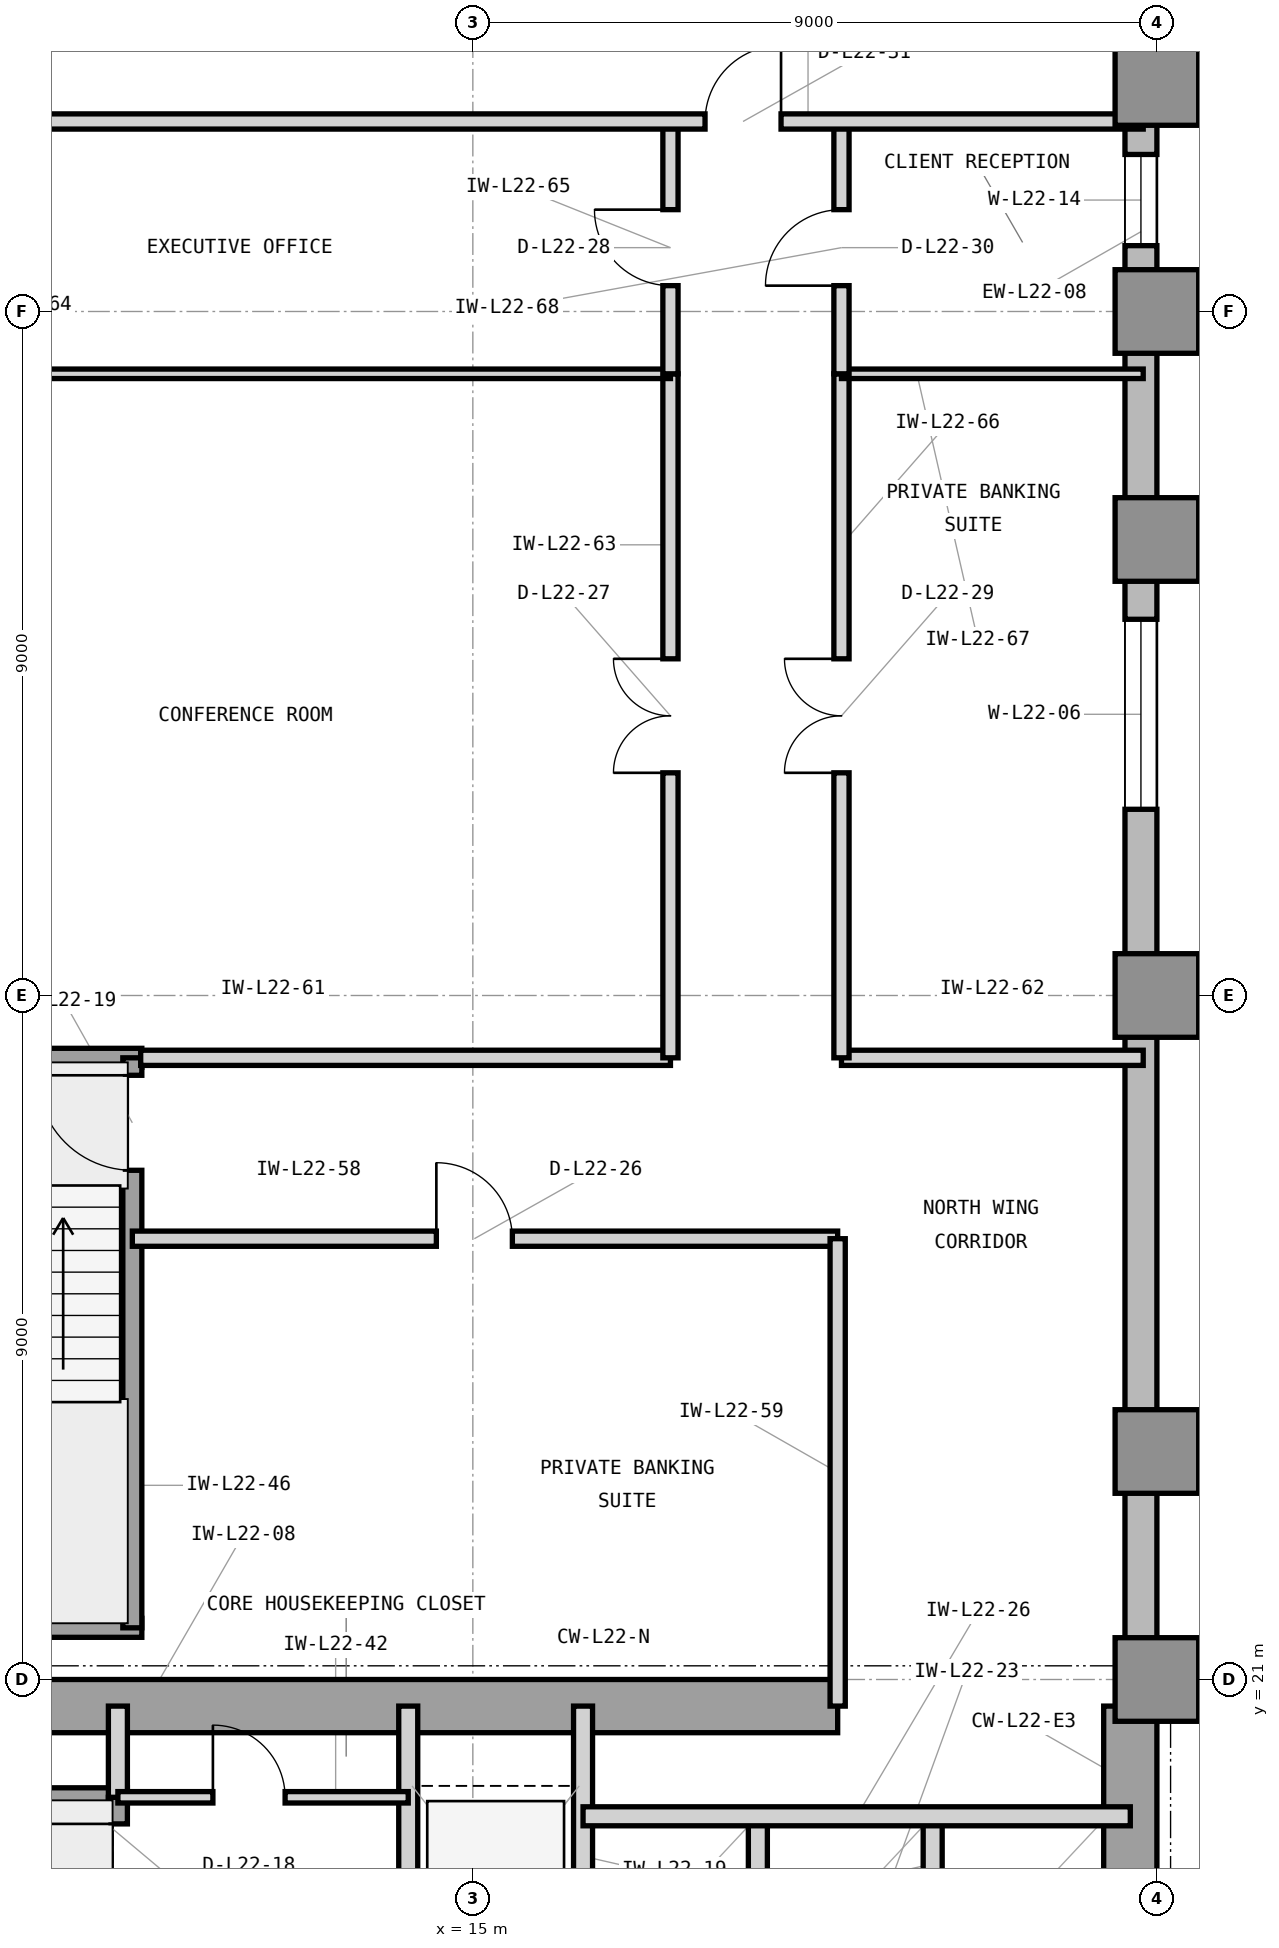
"""IFC4 building model, lengths in metres.
Left out: names, types, materials, properties, quantities, classifications, styles, units other than length and angle.
Written with IfcOpenShell. Run it as: python <this file> out.ifc"""

import sys

from ifc_helpers import new_model, si_unit, direction, frame, frame_2d, origin, origin_2d, place, context, subcontext, project, spatial, rectangle, extrude, element, fill, save


model = new_model("IFC4")
c1 = context("Model", 3, precision=1e-05, world=origin(), true_north=direction((0.0, 1.0)))
c2 = subcontext(c1, "Body", "Model", "MODEL_VIEW")
j1 = project(units=[si_unit("LENGTHUNIT", "METRE"), si_unit("PLANEANGLEUNIT", "RADIAN")], contexts=[c1])
p1 = place(None, origin())
s1 = spatial("IfcSite", under=j1, at=p1, CompositionType="ELEMENT")
p2 = place(p1, origin())
s2 = spatial("IfcBuilding", under=s1, at=p2, CompositionType="ELEMENT")
p3 = place(p2, frame((0.0, 0.0, 97.2)))
s3 = spatial("IfcBuildingStorey", under=s2, at=p3, CompositionType="ELEMENT", Elevation=97.2)
p4 = place(p3, frame((7.475, 20.65, 0.0), z_axis=(0.0, 0.0, 1.0), x_axis=(1.0, 0.0, 0.0)))
e1 = element("IfcWall", 1, at=p4, inside=s3, PredefinedType="SHEAR", context=c2, shape_type="SweptSolid", body=[
    extrude(rectangle(XDim=12.325, YDim=0.7, at=frame_2d((6.163, 0.0))), origin(), (0.0, 0.0, 1.0), 3.9),
])
p5 = place(p3, frame((23.65, 16.6, 0.0), z_axis=(0.0, 0.0, 1.0), x_axis=(0.0, 1.0, 0.0)))
e2 = element("IfcWall", 2, at=p5, inside=s3, PredefinedType="SHEAR", context=c2, shape_type="SweptSolid", body=[
    extrude(rectangle(XDim=4.05, YDim=0.7, at=frame_2d((2.025, 0.0))), origin(), (0.0, 0.0, 1.0), 3.9),
])
for number, where, z_axis, x_axis in (
    (3, (24.0, 21.0, 0.0), (0.0, 0.0, 1.0), (1.0, 0.0, 0.0)),
    (4, (24.0, 24.0, 0.0), (0.0, 0.0, 1.0), (1.0, 0.0, 0.0)),
    (5, (24.0, 30.0, 0.0), (0.0, 0.0, 1.0), (1.0, 0.0, 0.0)),
    (6, (24.0, 36.0, 0.0), (0.0, 0.0, 1.0), (1.0, 0.0, 0.0)),
    (7, (24.0, 39.0, 0.0), (0.0, 0.0, 1.0), (1.0, 0.0, 0.0)),
    (8, (24.0, 42.0, 0.0), (0.0, 0.0, 1.0), (1.0, 0.0, 0.0)),
):
    element("IfcColumn", number, at=place(p3, frame(where, z_axis=z_axis, x_axis=x_axis)), inside=s3, PredefinedType="COLUMN", context=c2, shape_type="SweptSolid", body=[
        extrude(rectangle(XDim=1.1, YDim=1.1, at=origin_2d()), origin(), (0.0, 0.0, 1.0), 3.9),
    ])
p6 = place(p3, frame((61.4, 20.79, 0.0), z_axis=(0.0, 0.0, 1.0), x_axis=(-1.0, 0.0, 0.0)))
e9 = element("IfcWall", 9, at=p6, inside=s3, PredefinedType="STANDARD", context=c2, shape_type="SweptSolid", body=[
    extrude(rectangle(XDim=37.4, YDim=0.42, at=frame_2d((18.7, 0.0))), origin(), (0.0, 0.0, 1.0), 3.7),
])
p7 = place(p6, frame((15.113, 0.0, 0.85)))
e10 = element("IfcOpeningElement", 10, at=p7, cuts=e9, PredefinedType="OPENING", context=c2, shape_type="SweptSolid", body=[
    extrude(rectangle(XDim=2.5, YDim=2.25, at=frame_2d((1.25, 1.125))), frame((0.0, 0.22, 0.0), z_axis=(0.0, -1.0, 0.0), x_axis=(1.0, 0.0, 0.0)), (0.0, 0.0, 1.0), 0.44),
])
p8 = place(p6, frame((24.462, 0.0, 0.85)))
e11 = element("IfcOpeningElement", 11, at=p8, cuts=e9, PredefinedType="OPENING", context=c2, shape_type="SweptSolid", body=[
    extrude(rectangle(XDim=2.5, YDim=2.25, at=frame_2d((1.25, 1.125))), frame((0.0, 0.22, 0.0), z_axis=(0.0, -1.0, 0.0), x_axis=(1.0, 0.0, 0.0)), (0.0, 0.0, 1.0), 0.44),
])
p9 = place(p3, frame((23.79, 21.0, 0.0), z_axis=(0.0, 0.0, 1.0), x_axis=(0.0, 1.0, 0.0)))
e12 = element("IfcWall", 12, at=p9, inside=s3, PredefinedType="STANDARD", context=c2, shape_type="SweptSolid", body=[
    extrude(rectangle(XDim=25.4, YDim=0.42, at=frame_2d((12.7, 0.0))), origin(), (0.0, 0.0, 1.0), 3.7),
])
p10 = place(p9, frame((11.45, 0.0, 0.85)))
e13 = element("IfcOpeningElement", 13, at=p10, cuts=e12, PredefinedType="OPENING", context=c2, shape_type="SweptSolid", body=[
    extrude(rectangle(XDim=2.5, YDim=2.25, at=frame_2d((1.25, 1.125))), frame((0.0, 0.22, 0.0), z_axis=(0.0, -1.0, 0.0), x_axis=(1.0, 0.0, 0.0)), (0.0, 0.0, 1.0), 0.44),
])
p11 = place(p9, frame((18.866, 0.0, 0.85)))
e14 = element("IfcOpeningElement", 14, at=p11, cuts=e12, PredefinedType="OPENING", context=c2, shape_type="SweptSolid", body=[
    extrude(rectangle(XDim=1.2, YDim=2.25, at=frame_2d((0.6, 1.125))), frame((0.0, 0.22, 0.0), z_axis=(0.0, -1.0, 0.0), x_axis=(1.0, 0.0, 0.0)), (0.0, 0.0, 1.0), 0.44),
])
p12 = place(p3, frame((7.7, 19.45, 0.0), z_axis=(0.0, 0.0, 1.0), x_axis=(1.0, 0.0, 0.0)))
e15 = element("IfcWall", 15, at=p12, inside=s3, PredefinedType="SHEAR", context=c2, shape_type="SweptSolid", body=[
    extrude(rectangle(XDim=2.755, YDim=0.25, at=frame_2d((1.377, 0.0))), origin(), (0.0, 0.0, 1.0), 3.9),
])
p13 = place(p3, frame((10.33, 12.0, 0.0), z_axis=(0.0, 0.0, 1.0), x_axis=(0.0, 1.0, 0.0)))
e16 = element("IfcWall", 16, at=p13, inside=s3, PredefinedType="SHEAR", context=c2, shape_type="SweptSolid", body=[
    extrude(rectangle(XDim=7.45, YDim=0.25, at=frame_2d((3.725, 0.0))), origin(), (0.0, 0.0, 1.0), 3.9),
])
p14 = place(p13, frame((5.85, 0.0, 0.0)))
e17 = element("IfcOpeningElement", 17, at=p14, cuts=e16, PredefinedType="OPENING", context=c2, shape_type="SweptSolid", body=[
    extrude(rectangle(XDim=1.25, YDim=2.2, at=frame_2d((0.625, 1.1))), frame((0.0, 0.135, 0.0), z_axis=(0.0, -1.0, 0.0), x_axis=(1.0, 0.0, 0.0)), (0.0, 0.0, 1.0), 0.27),
])
p15 = place(p3, frame((10.33, 19.45, 0.0), z_axis=(0.0, 0.0, 1.0), x_axis=(0.0, 1.0, 0.0)))
e18 = element("IfcWall", 18, at=p15, inside=s3, PredefinedType="PARTITIONING", context=c2, shape_type="SweptSolid", body=[
    extrude(rectangle(XDim=1.2, YDim=0.25, at=frame_2d((0.6, 0.0))), origin(), (0.0, 0.0, 1.0), 2.917),
])
for number, where, z_axis, x_axis in (
    (19, (14.15, 16.7, 0.0), (0.0, 0.0, 1.0), (0.0, 1.0, 0.0)),
    (20, (16.45, 16.7, 0.0), (0.0, 0.0, 1.0), (0.0, 1.0, 0.0)),
):
    element("IfcWall", number, at=place(p3, frame(where, z_axis=z_axis, x_axis=x_axis)), inside=s3, PredefinedType="PARTITIONING", context=c2, shape_type="SweptSolid", body=[
        extrude(rectangle(XDim=3.95, YDim=0.25, at=frame_2d((1.975, 0.0))), origin(), (0.0, 0.0, 1.0), 3.69),
    ])
for number, where, z_axis, x_axis in (
    (21, (18.75, 16.7, 0.0), (0.0, 0.0, 1.0), (0.0, 1.0, 0.0)),
    (22, (21.05, 16.7, 0.0), (0.0, 0.0, 1.0), (0.0, 1.0, 0.0)),
):
    element("IfcWall", number, at=place(p3, frame(where, z_axis=z_axis, x_axis=x_axis)), inside=s3, PredefinedType="PARTITIONING", context=c2, shape_type="SweptSolid", body=[
        extrude(rectangle(XDim=2.5, YDim=0.25, at=frame_2d((1.25, 0.0))), origin(), (0.0, 0.0, 1.0), 3.69),
    ])
p16 = place(p3, frame((16.45, 19.2, 0.0), z_axis=(0.0, 0.0, 1.0), x_axis=(1.0, 0.0, 0.0)))
e23 = element("IfcWall", 23, at=p16, inside=s3, PredefinedType="PARTITIONING", context=c2, shape_type="SweptSolid", body=[
    extrude(rectangle(XDim=7.2, YDim=0.25, at=frame_2d((3.6, 0.0))), origin(), (0.0, 0.0, 1.0), 3.69),
])
p17 = place(p3, frame((10.33, 19.45, 0.0), z_axis=(0.0, 0.0, 1.0), x_axis=(1.0, 0.0, 0.0)))
e24 = element("IfcWall", 24, at=p17, inside=s3, PredefinedType="PARTITIONING", context=c2, shape_type="SweptSolid", body=[
    extrude(rectangle(XDim=3.82, YDim=0.15, at=frame_2d((1.91, 0.0))), origin(), (0.0, 0.0, 1.0), 3.69),
])
p18 = place(p17, frame((1.25, 0.0, 0.0)))
e25 = element("IfcOpeningElement", 25, at=p18, cuts=e24, PredefinedType="OPENING", context=c2, shape_type="SweptSolid", body=[
    extrude(rectangle(XDim=0.95, YDim=2.1, at=frame_2d((0.475, 1.05))), frame((0.0, 0.085, 0.0), z_axis=(0.0, -1.0, 0.0), x_axis=(1.0, 0.0, 0.0)), (0.0, 0.0, 1.0), 0.17),
])
for number, where, z_axis, x_axis in (
    (26, (6.555, 21.68, 0.0), (0.0, 0.0, 1.0), (1.0, 0.0, 0.0)),
    (27, (6.555, 29.18, 0.0), (0.0, 0.0, 1.0), (1.0, 0.0, 0.0)),
):
    element("IfcWall", number, at=place(p3, frame(where, z_axis=z_axis, x_axis=x_axis)), inside=s3, PredefinedType="SHEAR", context=c2, shape_type="SweptSolid", body=[
        extrude(rectangle(XDim=4.09, YDim=0.25, at=frame_2d((2.045, 0.0))), origin(), (0.0, 0.0, 1.0), 3.9),
    ])
p19 = place(p3, frame((10.52, 21.68, 0.0), z_axis=(0.0, 0.0, 1.0), x_axis=(0.0, 1.0, 0.0)))
e28 = element("IfcWall", 28, at=p19, inside=s3, PredefinedType="SHEAR", context=c2, shape_type="SweptSolid", body=[
    extrude(rectangle(XDim=7.5, YDim=0.25, at=frame_2d((3.75, 0.0))), origin(), (0.0, 0.0, 1.0), 3.9),
])
p20 = place(p19, frame((6.02, 0.0, 0.0)))
e29 = element("IfcOpeningElement", 29, at=p20, cuts=e28, PredefinedType="OPENING", context=c2, shape_type="SweptSolid", body=[
    extrude(rectangle(XDim=1.25, YDim=2.2, at=frame_2d((0.625, 1.1))), frame((0.0, 0.135, 0.0), z_axis=(0.0, -1.0, 0.0), x_axis=(1.0, 0.0, 0.0)), (0.0, 0.0, 1.0), 0.27),
])
p21 = place(p3, frame((10.52, 26.8, 0.0), z_axis=(0.0, 0.0, 1.0), x_axis=(1.0, 0.0, 0.0)))
e30 = element("IfcWall", 30, at=p21, inside=s3, PredefinedType="PARTITIONING", context=c2, shape_type="SweptSolid", body=[
    extrude(rectangle(XDim=9.28, YDim=0.2, at=frame_2d((4.64, 0.0))), origin(), (0.0, 0.0, 1.0), 3.69),
])
p22 = place(p21, frame((4.0, 0.0, 0.0)))
e31 = element("IfcOpeningElement", 31, at=p22, cuts=e30, PredefinedType="OPENING", context=c2, shape_type="SweptSolid", body=[
    extrude(rectangle(XDim=1.0, YDim=2.15, at=frame_2d((0.5, 1.075))), frame((0.0, 0.11, 0.0), z_axis=(0.0, -1.0, 0.0), x_axis=(1.0, 0.0, 0.0)), (0.0, 0.0, 1.0), 0.22),
])
p23 = place(p3, frame((19.8, 20.65, 0.0), z_axis=(0.0, 0.0, 1.0), x_axis=(0.0, 1.0, 0.0)))
e32 = element("IfcWall", 32, at=p23, inside=s3, PredefinedType="PARTITIONING", context=c2, shape_type="SweptSolid", body=[
    extrude(rectangle(XDim=6.15, YDim=0.2, at=frame_2d((3.075, 0.0))), origin(), (0.0, 0.0, 1.0), 3.69),
])
p24 = place(p3, frame((10.63, 29.18, 0.0), z_axis=(0.0, 0.0, 1.0), x_axis=(1.0, 0.0, 0.0)))
e33 = element("IfcWall", 33, at=p24, inside=s3, PredefinedType="PARTITIONING", context=c2, shape_type="SweptSolid", body=[
    extrude(rectangle(XDim=6.97, YDim=0.2, at=frame_2d((3.485, 0.0))), origin(), (0.0, 0.0, 1.0), 3.69),
])
p25 = place(p3, frame((19.85, 29.18, 0.0), z_axis=(0.0, 0.0, 1.0), x_axis=(1.0, 0.0, 0.0)))
e34 = element("IfcWall", 34, at=p25, inside=s3, PredefinedType="PARTITIONING", context=c2, shape_type="SweptSolid", body=[
    extrude(rectangle(XDim=3.97, YDim=0.2, at=frame_2d((1.985, 0.0))), origin(), (0.0, 0.0, 1.0), 3.69),
])
p26 = place(p3, frame((17.6, 29.18, 0.0), z_axis=(0.0, 0.0, 1.0), x_axis=(0.0, 1.0, 0.0)))
e35 = element("IfcWall", 35, at=p26, inside=s3, PredefinedType="PARTITIONING", context=c2, shape_type="SweptSolid", body=[
    extrude(rectangle(XDim=9.0, YDim=0.2, at=frame_2d((4.5, 0.0))), origin(), (0.0, 0.0, 1.0), 3.69),
])
p27 = place(p26, frame((3.75, 0.0, 0.0)))
e36 = element("IfcOpeningElement", 36, at=p27, cuts=e35, PredefinedType="OPENING", context=c2, shape_type="SweptSolid", body=[
    extrude(rectangle(XDim=1.5, YDim=2.3, at=frame_2d((0.75, 1.15))), frame((0.0, 0.11, 0.0), z_axis=(0.0, -1.0, 0.0), x_axis=(1.0, 0.0, 0.0)), (0.0, 0.0, 1.0), 0.22),
])
p28 = place(p3, frame((6.18, 38.18, 0.0), z_axis=(0.0, 0.0, 1.0), x_axis=(1.0, 0.0, 0.0)))
e37 = element("IfcWall", 37, at=p28, inside=s3, PredefinedType="PARTITIONING", context=c2, shape_type="SweptSolid", body=[
    extrude(rectangle(XDim=11.42, YDim=0.125, at=frame_2d((5.71, 0.0))), origin(), (0.0, 0.0, 1.0), 3.69),
])
p29 = place(p3, frame((17.6, 38.18, 0.0), z_axis=(0.0, 0.0, 1.0), x_axis=(0.0, 1.0, 0.0)))
e38 = element("IfcWall", 38, at=p29, inside=s3, PredefinedType="PARTITIONING", context=c2, shape_type="SweptSolid", body=[
    extrude(rectangle(XDim=3.32, YDim=0.2, at=frame_2d((1.66, 0.0))), origin(), (0.0, 0.0, 1.0), 3.69),
])
p30 = place(p29, frame((1.16, 0.0, 0.0)))
e39 = element("IfcOpeningElement", 39, at=p30, cuts=e38, PredefinedType="OPENING", context=c2, shape_type="SweptSolid", body=[
    extrude(rectangle(XDim=1.0, YDim=2.15, at=frame_2d((0.5, 1.075))), frame((0.0, 0.11, 0.0), z_axis=(0.0, -1.0, 0.0), x_axis=(1.0, 0.0, 0.0)), (0.0, 0.0, 1.0), 0.22),
])
p31 = place(p3, frame((19.85, 29.18, 0.0), z_axis=(0.0, 0.0, 1.0), x_axis=(0.0, 1.0, 0.0)))
e40 = element("IfcWall", 40, at=p31, inside=s3, PredefinedType="PARTITIONING", context=c2, shape_type="SweptSolid", body=[
    extrude(rectangle(XDim=9.0, YDim=0.2, at=frame_2d((4.5, 0.0))), origin(), (0.0, 0.0, 1.0), 3.69),
])
p32 = place(p31, frame((3.75, 0.0, 0.0)))
e41 = element("IfcOpeningElement", 41, at=p32, cuts=e40, PredefinedType="OPENING", context=c2, shape_type="SweptSolid", body=[
    extrude(rectangle(XDim=1.5, YDim=2.3, at=frame_2d((0.75, 1.15))), frame((0.0, 0.11, 0.0), z_axis=(0.0, -1.0, 0.0), x_axis=(1.0, 0.0, 0.0)), (0.0, 0.0, 1.0), 0.22),
])
p33 = place(p3, frame((19.85, 38.18, 0.0), z_axis=(0.0, 0.0, 1.0), x_axis=(1.0, 0.0, 0.0)))
e42 = element("IfcWall", 42, at=p33, inside=s3, PredefinedType="PARTITIONING", context=c2, shape_type="SweptSolid", body=[
    extrude(rectangle(XDim=3.97, YDim=0.125, at=frame_2d((1.985, 0.0))), origin(), (0.0, 0.0, 1.0), 3.69),
])
p34 = place(p3, frame((19.85, 38.18, 0.0), z_axis=(0.0, 0.0, 1.0), x_axis=(0.0, 1.0, 0.0)))
e43 = element("IfcWall", 43, at=p34, inside=s3, PredefinedType="PARTITIONING", context=c2, shape_type="SweptSolid", body=[
    extrude(rectangle(XDim=3.32, YDim=0.2, at=frame_2d((1.66, 0.0))), origin(), (0.0, 0.0, 1.0), 3.69),
])
p35 = place(p34, frame((1.16, 0.0, 0.0)))
e44 = element("IfcOpeningElement", 44, at=p35, cuts=e43, PredefinedType="OPENING", context=c2, shape_type="SweptSolid", body=[
    extrude(rectangle(XDim=1.0, YDim=2.15, at=frame_2d((0.5, 1.075))), frame((0.0, 0.11, 0.0), z_axis=(0.0, -1.0, 0.0), x_axis=(1.0, 0.0, 0.0)), (0.0, 0.0, 1.0), 0.22),
])
p36 = place(p3, frame((6.18, 41.5, 0.0), z_axis=(0.0, 0.0, 1.0), x_axis=(1.0, 0.0, 0.0)))
e45 = element("IfcWall", 45, at=p36, inside=s3, PredefinedType="PARTITIONING", context=c2, shape_type="SweptSolid", body=[
    extrude(rectangle(XDim=17.64, YDim=0.2, at=frame_2d((8.82, 0.0))), origin(), (0.0, 0.0, 1.0), 3.69),
])
p37 = place(p36, frame((11.875, 0.0, 0.0)))
e46 = element("IfcOpeningElement", 46, at=p37, cuts=e45, PredefinedType="OPENING", context=c2, shape_type="SweptSolid", body=[
    extrude(rectangle(XDim=1.0, YDim=2.15, at=frame_2d((0.5, 1.075))), frame((0.0, 0.11, 0.0), z_axis=(0.0, -1.0, 0.0), x_axis=(1.0, 0.0, 0.0)), (0.0, 0.0, 1.0), 0.22),
])
p38 = place(p10, origin())
e47 = element("IfcWindow", 47, at=p38, inside=s3, PartitioningType="SINGLE_PANEL", PredefinedType="WINDOW", context=c2, shape_type="SweptSolid", body=[
    extrude(rectangle(XDim=2.5, YDim=2.25, at=frame_2d((1.25, 1.125))), frame((0.0, 0.11, 0.0), z_axis=(0.0, -1.0, 0.0), x_axis=(1.0, 0.0, 0.0)), (0.0, 0.0, 1.0), 0.06),
])
fill(e13, e47)
p39 = place(p14, origin())
e48 = element("IfcDoor", 48, at=p39, inside=s3, OperationType="SINGLE_SWING_RIGHT", PredefinedType="DOOR", context=c2, shape_type="SweptSolid", body=[
    extrude(rectangle(XDim=1.25, YDim=2.2, at=frame_2d((0.625, 1.1))), frame((0.0, 0.025, 0.0), z_axis=(0.0, -1.0, 0.0), x_axis=(1.0, 0.0, 0.0)), (0.0, 0.0, 1.0), 0.05),
])
fill(e17, e48)
p40 = place(p18, origin())
e49 = element("IfcDoor", 49, at=p40, inside=s3, OperationType="SINGLE_SWING_LEFT", PredefinedType="DOOR", context=c2, shape_type="SweptSolid", body=[
    extrude(rectangle(XDim=0.95, YDim=2.1, at=frame_2d((0.475, 1.05))), frame((0.0, 0.025, 0.0), z_axis=(0.0, -1.0, 0.0), x_axis=(1.0, 0.0, 0.0)), (0.0, 0.0, 1.0), 0.05),
])
fill(e25, e49)
p41 = place(p20, origin())
e50 = element("IfcDoor", 50, at=p41, inside=s3, OperationType="SINGLE_SWING_RIGHT", PredefinedType="DOOR", context=c2, shape_type="SweptSolid", body=[
    extrude(rectangle(XDim=1.25, YDim=2.2, at=frame_2d((0.625, 1.1))), frame((0.0, 0.025, 0.0), z_axis=(0.0, -1.0, 0.0), x_axis=(1.0, 0.0, 0.0)), (0.0, 0.0, 1.0), 0.05),
])
fill(e29, e50)
p42 = place(p22, origin())
e51 = element("IfcDoor", 51, at=p42, inside=s3, OperationType="SINGLE_SWING_LEFT", PredefinedType="DOOR", context=c2, shape_type="SweptSolid", body=[
    extrude(rectangle(XDim=1.0, YDim=2.15, at=frame_2d((0.5, 1.075))), frame((0.0, 0.025, 0.0), z_axis=(0.0, -1.0, 0.0), x_axis=(1.0, 0.0, 0.0)), (0.0, 0.0, 1.0), 0.05),
])
fill(e31, e51)
p43 = place(p27, origin())
e52 = element("IfcDoor", 52, at=p43, inside=s3, OperationType="DOUBLE_DOOR_SINGLE_SWING", PredefinedType="DOOR", context=c2, shape_type="SweptSolid", body=[
    extrude(rectangle(XDim=1.5, YDim=2.3, at=frame_2d((0.75, 1.15))), frame((0.0, 0.025, 0.0), z_axis=(0.0, -1.0, 0.0), x_axis=(1.0, 0.0, 0.0)), (0.0, 0.0, 1.0), 0.05),
])
fill(e36, e52)
p44 = place(p30, origin())
e53 = element("IfcDoor", 53, at=p44, inside=s3, OperationType="SINGLE_SWING_RIGHT", PredefinedType="DOOR", context=c2, shape_type="SweptSolid", body=[
    extrude(rectangle(XDim=1.0, YDim=2.15, at=frame_2d((0.5, 1.075))), frame((0.0, 0.025, 0.0), z_axis=(0.0, -1.0, 0.0), x_axis=(1.0, 0.0, 0.0)), (0.0, 0.0, 1.0), 0.05),
])
fill(e39, e53)
p45 = place(p32, origin())
e54 = element("IfcDoor", 54, at=p45, inside=s3, OperationType="DOUBLE_DOOR_SINGLE_SWING", PredefinedType="DOOR", context=c2, shape_type="SweptSolid", body=[
    extrude(rectangle(XDim=1.5, YDim=2.3, at=frame_2d((0.75, 1.15))), frame((0.0, 0.025, 0.0), z_axis=(0.0, -1.0, 0.0), x_axis=(1.0, 0.0, 0.0)), (0.0, 0.0, 1.0), 0.05),
])
fill(e41, e54)
p46 = place(p35, origin())
e55 = element("IfcDoor", 55, at=p46, inside=s3, OperationType="SINGLE_SWING_LEFT", PredefinedType="DOOR", context=c2, shape_type="SweptSolid", body=[
    extrude(rectangle(XDim=1.0, YDim=2.15, at=frame_2d((0.5, 1.075))), frame((0.0, 0.025, 0.0), z_axis=(0.0, -1.0, 0.0), x_axis=(1.0, 0.0, 0.0)), (0.0, 0.0, 1.0), 0.05),
])
fill(e44, e55)
p47 = place(p37, origin())
e56 = element("IfcDoor", 56, at=p47, inside=s3, OperationType="SINGLE_SWING_RIGHT", PredefinedType="DOOR", context=c2, shape_type="SweptSolid", body=[
    extrude(rectangle(XDim=1.0, YDim=2.15, at=frame_2d((0.5, 1.075))), frame((0.0, 0.025, 0.0), z_axis=(0.0, -1.0, 0.0), x_axis=(1.0, 0.0, 0.0)), (0.0, 0.0, 1.0), 0.05),
])
fill(e46, e56)
p48 = place(p11, origin())
e57 = element("IfcWindow", 57, at=p48, inside=s3, PartitioningType="SINGLE_PANEL", PredefinedType="WINDOW", context=c2, shape_type="SweptSolid", body=[
    extrude(rectangle(XDim=1.2, YDim=2.25, at=frame_2d((0.6, 1.125))), frame((0.0, 0.11, 0.0), z_axis=(0.0, -1.0, 0.0), x_axis=(1.0, 0.0, 0.0)), (0.0, 0.0, 1.0), 0.06),
])
fill(e14, e57)
save(model, sys.argv[1])
